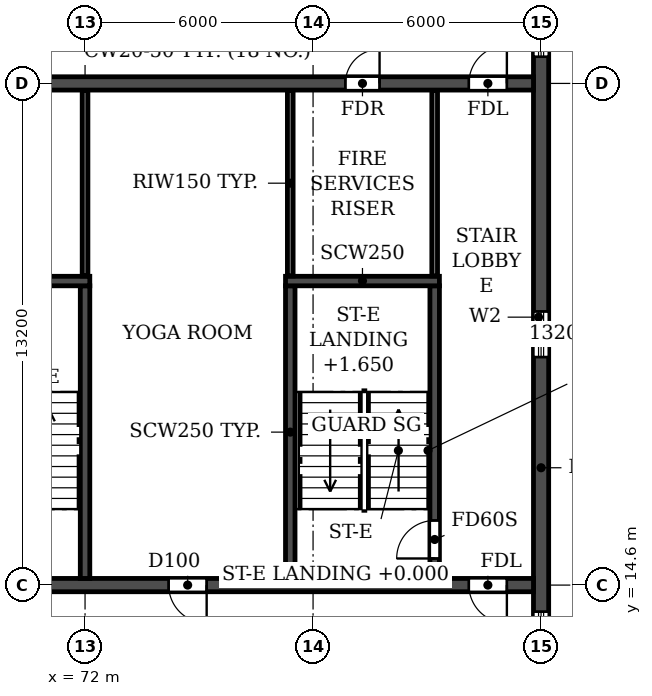
"""IFC4 building model, lengths in metres.
Left out: names, types, materials, properties, quantities, classifications, styles, units other than length and angle.
Written with IfcOpenShell. Run it as: python <this file> out.ifc"""

import sys

from ifc_helpers import new_model, si_unit, direction, frame, frame_2d, origin, place, context, subcontext, project, spatial, rectangle, extrude, element, fill, save


model = new_model("IFC4")
c1 = context("Model", 3, precision=1e-05, world=origin(), true_north=direction((0.0, 1.0)))
c2 = subcontext(c1, "Body", "Model", "MODEL_VIEW")
j1 = project(units=[si_unit("LENGTHUNIT", "METRE"), si_unit("PLANEANGLEUNIT", "RADIAN")], contexts=[c1])
p1 = place(None, origin())
s1 = spatial("IfcSite", under=j1, at=p1, CompositionType="ELEMENT")
p2 = place(p1, origin())
s2 = spatial("IfcBuilding", under=s1, at=p2, CompositionType="ELEMENT")
p3 = place(p2, frame((0.0, 0.0, 221.4)))
s3 = spatial("IfcBuildingStorey", under=s2, at=p3, CompositionType="ELEMENT", Elevation=221.4)
p4 = place(p3, frame((84.0, 4.683, 0.0), z_axis=(0.0, 0.0, 1.0), x_axis=(0.0, 1.0, 0.0)))
e1 = element("IfcWall", 1, at=p4, inside=s3, PredefinedType="SHEAR", context=c2, shape_type="SweptSolid", body=[
    extrude(rectangle(XDim=31.834, YDim=0.4, at=frame_2d((15.917, 0.0))), origin(), (0.0, 0.0, 1.0), 3.08),
])
p5 = place(p4, frame((23.817, 0.0, 0.9)))
e2 = element("IfcOpeningElement", 2, at=p5, cuts=e1, PredefinedType="OPENING", context=c2, shape_type="SweptSolid", body=[
    extrude(rectangle(XDim=1.2, YDim=1.5, at=frame_2d((0.6, 0.75))), frame((0.0, 0.21, 0.0), z_axis=(0.0, -1.0, 0.0), x_axis=(1.0, 0.0, 0.0)), (0.0, 0.0, 1.0), 0.42),
])
p6 = place(p4, frame((8.017, 0.0, 0.9)))
e3 = element("IfcOpeningElement", 3, at=p6, cuts=e1, PredefinedType="OPENING", context=c2, shape_type="SweptSolid", body=[
    extrude(rectangle(XDim=1.2, YDim=1.5, at=frame_2d((0.6, 0.75))), frame((0.0, 0.21, 0.0), z_axis=(0.0, -1.0, 0.0), x_axis=(1.0, 0.0, 0.0)), (0.0, 0.0, 1.0), 0.42),
])
p7 = place(p4, frame((27.694, 0.0, 0.6)))
e4 = element("IfcOpeningElement", 4, at=p7, cuts=e1, PredefinedType="OPENING", context=c2, shape_type="SweptSolid", body=[
    extrude(rectangle(XDim=2.2, YDim=1.8, at=frame_2d((1.1, 0.9))), frame((0.0, 0.21, 0.0), z_axis=(0.0, -1.0, 0.0), x_axis=(1.0, 0.0, 0.0)), (0.0, 0.0, 1.0), 0.42),
])
p8 = place(p4, frame((2.541, 0.0, 0.6)))
e5 = element("IfcOpeningElement", 5, at=p8, cuts=e1, PredefinedType="OPENING", context=c2, shape_type="SweptSolid", body=[
    extrude(rectangle(XDim=2.2, YDim=1.8, at=frame_2d((1.1, 0.9))), frame((0.0, 0.21, 0.0), z_axis=(0.0, -1.0, 0.0), x_axis=(1.0, 0.0, 0.0)), (0.0, 0.0, 1.0), 0.42),
])
p9 = place(p4, frame((15.917, 0.0, 0.9)))
e6 = element("IfcOpeningElement", 6, at=p9, cuts=e1, PredefinedType="OPENING", context=c2, shape_type="SweptSolid", body=[
    extrude(rectangle(XDim=1.2, YDim=1.5, at=frame_2d((0.6, 0.75))), frame((0.0, 0.21, 0.0), z_axis=(0.0, -1.0, 0.0), x_axis=(1.0, 0.0, 0.0)), (0.0, 0.0, 1.0), 0.42),
])
p10 = place(p3, frame((18.2, 14.6, 0.0), z_axis=(0.0, 0.0, 1.0), x_axis=(1.0, 0.0, 0.0)))
e7 = element("IfcWall", 7, at=p10, inside=s3, PredefinedType="SOLIDWALL", context=c2, shape_type="SweptSolid", body=[
    extrude(rectangle(XDim=65.6, YDim=0.35, at=frame_2d((32.8, 0.0))), origin(), (0.0, 0.0, 1.0), 3.08),
])
p11 = place(p10, frame((0.7, 0.0, 0.0)))
e8 = element("IfcOpeningElement", 8, at=p11, cuts=e7, PredefinedType="OPENING", context=c2, shape_type="SweptSolid", body=[
    extrude(rectangle(XDim=1.0, YDim=2.1, at=frame_2d((0.5, 1.05))), frame((0.0, 0.185, 0.0), z_axis=(0.0, -1.0, 0.0), x_axis=(1.0, 0.0, 0.0)), (0.0, 0.0, 1.0), 0.37),
])
p12 = place(p10, frame((8.6, 0.0, 0.0)))
e9 = element("IfcOpeningElement", 9, at=p12, cuts=e7, PredefinedType="OPENING", context=c2, shape_type="SweptSolid", body=[
    extrude(rectangle(XDim=1.0, YDim=2.1, at=frame_2d((0.5, 1.05))), frame((0.0, 0.185, 0.0), z_axis=(0.0, -1.0, 0.0), x_axis=(1.0, 0.0, 0.0)), (0.0, 0.0, 1.0), 0.37),
])
p13 = place(p10, frame((13.2, 0.0, 0.0)))
e10 = element("IfcOpeningElement", 10, at=p13, cuts=e7, PredefinedType="OPENING", context=c2, shape_type="SweptSolid", body=[
    extrude(rectangle(XDim=1.0, YDim=2.1, at=frame_2d((0.5, 1.05))), frame((0.0, 0.185, 0.0), z_axis=(0.0, -1.0, 0.0), x_axis=(1.0, 0.0, 0.0)), (0.0, 0.0, 1.0), 0.37),
])
p14 = place(p10, frame((27.1, 0.0, 0.0)))
e11 = element("IfcOpeningElement", 11, at=p14, cuts=e7, PredefinedType="OPENING", context=c2, shape_type="SweptSolid", body=[
    extrude(rectangle(XDim=1.0, YDim=2.1, at=frame_2d((0.5, 1.05))), frame((0.0, 0.185, 0.0), z_axis=(0.0, -1.0, 0.0), x_axis=(1.0, 0.0, 0.0)), (0.0, 0.0, 1.0), 0.37),
])
p15 = place(p10, frame((32.3, 0.0, 0.0)))
e12 = element("IfcOpeningElement", 12, at=p15, cuts=e7, PredefinedType="OPENING", context=c2, shape_type="SweptSolid", body=[
    extrude(rectangle(XDim=1.0, YDim=2.1, at=frame_2d((0.5, 1.05))), frame((0.0, 0.185, 0.0), z_axis=(0.0, -1.0, 0.0), x_axis=(1.0, 0.0, 0.0)), (0.0, 0.0, 1.0), 0.37),
])
p16 = place(p10, frame((35.95, 0.0, 0.0)))
e13 = element("IfcOpeningElement", 13, at=p16, cuts=e7, PredefinedType="OPENING", context=c2, shape_type="SweptSolid", body=[
    extrude(rectangle(XDim=1.5, YDim=2.1, at=frame_2d((0.75, 1.05))), frame((0.0, 0.185, 0.0), z_axis=(0.0, -1.0, 0.0), x_axis=(1.0, 0.0, 0.0)), (0.0, 0.0, 1.0), 0.37),
])
p17 = place(p10, frame((40.1, 0.0, 0.0)))
e14 = element("IfcOpeningElement", 14, at=p17, cuts=e7, PredefinedType="OPENING", context=c2, shape_type="SweptSolid", body=[
    extrude(rectangle(XDim=1.0, YDim=2.1, at=frame_2d((0.5, 1.05))), frame((0.0, 0.185, 0.0), z_axis=(0.0, -1.0, 0.0), x_axis=(1.0, 0.0, 0.0)), (0.0, 0.0, 1.0), 0.37),
])
p18 = place(p10, frame((51.4, 0.0, 0.0)))
e15 = element("IfcOpeningElement", 15, at=p18, cuts=e7, PredefinedType="OPENING", context=c2, shape_type="SweptSolid", body=[
    extrude(rectangle(XDim=1.0, YDim=2.1, at=frame_2d((0.5, 1.05))), frame((0.0, 0.185, 0.0), z_axis=(0.0, -1.0, 0.0), x_axis=(1.0, 0.0, 0.0)), (0.0, 0.0, 1.0), 0.37),
])
p19 = place(p10, frame((56.0, 0.0, 0.0)))
e16 = element("IfcOpeningElement", 16, at=p19, cuts=e7, PredefinedType="OPENING", context=c2, shape_type="SweptSolid", body=[
    extrude(rectangle(XDim=1.0, YDim=2.1, at=frame_2d((0.5, 1.05))), frame((0.0, 0.185, 0.0), z_axis=(0.0, -1.0, 0.0), x_axis=(1.0, 0.0, 0.0)), (0.0, 0.0, 1.0), 0.37),
])
p20 = place(p10, frame((63.9, 0.0, 0.0)))
e17 = element("IfcOpeningElement", 17, at=p20, cuts=e7, PredefinedType="OPENING", context=c2, shape_type="SweptSolid", body=[
    extrude(rectangle(XDim=1.0, YDim=2.1, at=frame_2d((0.5, 1.05))), frame((0.0, 0.185, 0.0), z_axis=(0.0, -1.0, 0.0), x_axis=(1.0, 0.0, 0.0)), (0.0, 0.0, 1.0), 0.37),
])
p21 = place(p3, frame((18.2, 27.8, 0.0), z_axis=(0.0, 0.0, 1.0), x_axis=(1.0, 0.0, 0.0)))
e18 = element("IfcWall", 18, at=p21, inside=s3, PredefinedType="SOLIDWALL", context=c2, shape_type="SweptSolid", body=[
    extrude(rectangle(XDim=65.6, YDim=0.35, at=frame_2d((32.8, 0.0))), origin(), (0.0, 0.0, 1.0), 3.08),
])
p22 = place(p21, frame((0.7, 0.0, 0.0)))
e19 = element("IfcOpeningElement", 19, at=p22, cuts=e18, PredefinedType="OPENING", context=c2, shape_type="SweptSolid", body=[
    extrude(rectangle(XDim=1.0, YDim=2.1, at=frame_2d((0.5, 1.05))), frame((0.0, 0.185, 0.0), z_axis=(0.0, -1.0, 0.0), x_axis=(1.0, 0.0, 0.0)), (0.0, 0.0, 1.0), 0.37),
])
p23 = place(p21, frame((4.05, 0.0, 0.0)))
e20 = element("IfcOpeningElement", 20, at=p23, cuts=e18, PredefinedType="OPENING", context=c2, shape_type="SweptSolid", body=[
    extrude(rectangle(XDim=0.9, YDim=2.1, at=frame_2d((0.45, 1.05))), frame((0.0, 0.185, 0.0), z_axis=(0.0, -1.0, 0.0), x_axis=(1.0, 0.0, 0.0)), (0.0, 0.0, 1.0), 0.37),
])
p24 = place(p21, frame((13.25, 0.0, 0.0)))
e21 = element("IfcOpeningElement", 21, at=p24, cuts=e18, PredefinedType="OPENING", context=c2, shape_type="SweptSolid", body=[
    extrude(rectangle(XDim=0.9, YDim=2.1, at=frame_2d((0.45, 1.05))), frame((0.0, 0.185, 0.0), z_axis=(0.0, -1.0, 0.0), x_axis=(1.0, 0.0, 0.0)), (0.0, 0.0, 1.0), 0.37),
])
p25 = place(p21, frame((17.7, 0.0, 0.0)))
e22 = element("IfcOpeningElement", 22, at=p25, cuts=e18, PredefinedType="OPENING", context=c2, shape_type="SweptSolid", body=[
    extrude(rectangle(XDim=1.0, YDim=2.1, at=frame_2d((0.5, 1.05))), frame((0.0, 0.185, 0.0), z_axis=(0.0, -1.0, 0.0), x_axis=(1.0, 0.0, 0.0)), (0.0, 0.0, 1.0), 0.37),
])
p26 = place(p21, frame((22.9, 0.0, 0.0)))
e23 = element("IfcOpeningElement", 23, at=p26, cuts=e18, PredefinedType="OPENING", context=c2, shape_type="SweptSolid", body=[
    extrude(rectangle(XDim=1.0, YDim=2.1, at=frame_2d((0.5, 1.05))), frame((0.0, 0.185, 0.0), z_axis=(0.0, -1.0, 0.0), x_axis=(1.0, 0.0, 0.0)), (0.0, 0.0, 1.0), 0.37),
])
p27 = place(p21, frame((29.4, 0.0, 0.0)))
e24 = element("IfcOpeningElement", 24, at=p27, cuts=e18, PredefinedType="OPENING", context=c2, shape_type="SweptSolid", body=[
    extrude(rectangle(XDim=1.0, YDim=2.1, at=frame_2d((0.5, 1.05))), frame((0.0, 0.185, 0.0), z_axis=(0.0, -1.0, 0.0), x_axis=(1.0, 0.0, 0.0)), (0.0, 0.0, 1.0), 0.37),
])
p28 = place(p21, frame((32.3, 0.0, 0.0)))
e25 = element("IfcOpeningElement", 25, at=p28, cuts=e18, PredefinedType="OPENING", context=c2, shape_type="SweptSolid", body=[
    extrude(rectangle(XDim=1.0, YDim=2.1, at=frame_2d((0.5, 1.05))), frame((0.0, 0.185, 0.0), z_axis=(0.0, -1.0, 0.0), x_axis=(1.0, 0.0, 0.0)), (0.0, 0.0, 1.0), 0.37),
])
p29 = place(p21, frame((36.25, 0.0, 0.0)))
e26 = element("IfcOpeningElement", 26, at=p29, cuts=e18, PredefinedType="OPENING", context=c2, shape_type="SweptSolid", body=[
    extrude(rectangle(XDim=1.5, YDim=2.1, at=frame_2d((0.75, 1.05))), frame((0.0, 0.185, 0.0), z_axis=(0.0, -1.0, 0.0), x_axis=(1.0, 0.0, 0.0)), (0.0, 0.0, 1.0), 0.37),
])
p30 = place(p21, frame((41.7, 0.0, 0.0)))
e27 = element("IfcOpeningElement", 27, at=p30, cuts=e18, PredefinedType="OPENING", context=c2, shape_type="SweptSolid", body=[
    extrude(rectangle(XDim=1.0, YDim=2.1, at=frame_2d((0.5, 1.05))), frame((0.0, 0.185, 0.0), z_axis=(0.0, -1.0, 0.0), x_axis=(1.0, 0.0, 0.0)), (0.0, 0.0, 1.0), 0.37),
])
p31 = place(p21, frame((46.9, 0.0, 0.0)))
e28 = element("IfcOpeningElement", 28, at=p31, cuts=e18, PredefinedType="OPENING", context=c2, shape_type="SweptSolid", body=[
    extrude(rectangle(XDim=1.0, YDim=2.1, at=frame_2d((0.5, 1.05))), frame((0.0, 0.185, 0.0), z_axis=(0.0, -1.0, 0.0), x_axis=(1.0, 0.0, 0.0)), (0.0, 0.0, 1.0), 0.37),
])
p32 = place(p21, frame((51.45, 0.0, 0.0)))
e29 = element("IfcOpeningElement", 29, at=p32, cuts=e18, PredefinedType="OPENING", context=c2, shape_type="SweptSolid", body=[
    extrude(rectangle(XDim=0.9, YDim=2.1, at=frame_2d((0.45, 1.05))), frame((0.0, 0.185, 0.0), z_axis=(0.0, -1.0, 0.0), x_axis=(1.0, 0.0, 0.0)), (0.0, 0.0, 1.0), 0.37),
])
p33 = place(p21, frame((60.65, 0.0, 0.0)))
e30 = element("IfcOpeningElement", 30, at=p33, cuts=e18, PredefinedType="OPENING", context=c2, shape_type="SweptSolid", body=[
    extrude(rectangle(XDim=0.9, YDim=2.1, at=frame_2d((0.45, 1.05))), frame((0.0, 0.185, 0.0), z_axis=(0.0, -1.0, 0.0), x_axis=(1.0, 0.0, 0.0)), (0.0, 0.0, 1.0), 0.37),
])
p34 = place(p21, frame((63.9, 0.0, 0.0)))
e31 = element("IfcOpeningElement", 31, at=p34, cuts=e18, PredefinedType="OPENING", context=c2, shape_type="SweptSolid", body=[
    extrude(rectangle(XDim=1.0, YDim=2.1, at=frame_2d((0.5, 1.05))), frame((0.0, 0.185, 0.0), z_axis=(0.0, -1.0, 0.0), x_axis=(1.0, 0.0, 0.0)), (0.0, 0.0, 1.0), 0.37),
])
p35 = place(p3, frame((72.0, 14.775, 0.0), z_axis=(0.0, 0.0, 1.0), x_axis=(0.0, 1.0, 0.0)))
e32 = element("IfcWall", 32, at=p35, inside=s3, PredefinedType="SOLIDWALL", context=c2, shape_type="SweptSolid", body=[
    extrude(rectangle(XDim=7.7, YDim=0.25, at=frame_2d((3.85, 0.0))), origin(), (0.0, 0.0, 1.0), 3.08),
])
p36 = place(p3, frame((68.075, 22.6, 0.0), z_axis=(0.0, 0.0, 1.0), x_axis=(1.0, 0.0, 0.0)))
e33 = element("IfcWall", 33, at=p36, inside=s3, PredefinedType="SOLIDWALL", context=c2, shape_type="SweptSolid", body=[
    extrude(rectangle(XDim=4.05, YDim=0.25, at=frame_2d((2.025, 0.0))), origin(), (0.0, 0.0, 1.0), 3.08),
])
p37 = place(p3, frame((77.4, 14.775, 0.0), z_axis=(0.0, 0.0, 1.0), x_axis=(0.0, 1.0, 0.0)))
e34 = element("IfcWall", 34, at=p37, inside=s3, PredefinedType="SOLIDWALL", context=c2, shape_type="SweptSolid", body=[
    extrude(rectangle(XDim=7.7, YDim=0.25, at=frame_2d((3.85, 0.0))), origin(), (0.0, 0.0, 1.0), 3.08),
])
p38 = place(p3, frame((81.2, 14.775, 0.0), z_axis=(0.0, 0.0, 1.0), x_axis=(0.0, 1.0, 0.0)))
e35 = element("IfcWall", 35, at=p38, inside=s3, PredefinedType="SOLIDWALL", context=c2, shape_type="SweptSolid", body=[
    extrude(rectangle(XDim=7.7, YDim=0.25, at=frame_2d((3.85, 0.0))), origin(), (0.0, 0.0, 1.0), 3.08),
])
p39 = place(p38, frame((0.525, 0.0, 0.0)))
e36 = element("IfcOpeningElement", 36, at=p39, cuts=e35, PredefinedType="OPENING", context=c2, shape_type="SweptSolid", body=[
    extrude(rectangle(XDim=1.0, YDim=2.1, at=frame_2d((0.5, 1.05))), frame((0.0, 0.135, 0.0), z_axis=(0.0, -1.0, 0.0), x_axis=(1.0, 0.0, 0.0)), (0.0, 0.0, 1.0), 0.27),
])
p40 = place(p3, frame((77.275, 22.6, 0.0), z_axis=(0.0, 0.0, 1.0), x_axis=(1.0, 0.0, 0.0)))
e37 = element("IfcWall", 37, at=p40, inside=s3, PredefinedType="SOLIDWALL", context=c2, shape_type="SweptSolid", body=[
    extrude(rectangle(XDim=4.05, YDim=0.25, at=frame_2d((2.025, 0.0))), origin(), (0.0, 0.0, 1.0), 3.08),
])
for number, where, z_axis, x_axis in (
    (38, (72.0, 22.735, 0.0), (0.0, 0.0, 1.0), (0.0, 1.0, 0.0)),
    (39, (77.4, 22.735, 0.0), (0.0, 0.0, 1.0), (0.0, 1.0, 0.0)),
    (40, (81.2, 22.735, 0.0), (0.0, 0.0, 1.0), (0.0, 1.0, 0.0)),
):
    element("IfcWall", number, at=place(p3, frame(where, z_axis=z_axis, x_axis=x_axis)), inside=s3, PredefinedType="PARTITIONING", context=c2, shape_type="SweptSolid", body=[
        extrude(rectangle(XDim=4.88, YDim=0.15, at=frame_2d((2.44, 0.0))), origin(), (0.0, 0.0, 1.0), 3.08),
    ])
p41 = place(p5, origin())
e41 = element("IfcWindow", 41, at=p41, inside=s3, PartitioningType="SINGLE_PANEL", PredefinedType="WINDOW", context=c2, shape_type="SweptSolid", body=[
    extrude(rectangle(XDim=1.2, YDim=1.5, at=frame_2d((0.6, 0.75))), frame((0.0, 0.03, 0.0), z_axis=(0.0, -1.0, 0.0), x_axis=(1.0, 0.0, 0.0)), (0.0, 0.0, 1.0), 0.06),
])
fill(e2, e41)
p42 = place(p6, origin())
e42 = element("IfcWindow", 42, at=p42, inside=s3, PartitioningType="SINGLE_PANEL", PredefinedType="WINDOW", context=c2, shape_type="SweptSolid", body=[
    extrude(rectangle(XDim=1.2, YDim=1.5, at=frame_2d((0.6, 0.75))), frame((0.0, 0.03, 0.0), z_axis=(0.0, -1.0, 0.0), x_axis=(1.0, 0.0, 0.0)), (0.0, 0.0, 1.0), 0.06),
])
fill(e3, e42)
p43 = place(p9, origin())
e43 = element("IfcWindow", 43, at=p43, inside=s3, PartitioningType="SINGLE_PANEL", PredefinedType="WINDOW", context=c2, shape_type="SweptSolid", body=[
    extrude(rectangle(XDim=1.2, YDim=1.5, at=frame_2d((0.6, 0.75))), frame((0.0, 0.03, 0.0), z_axis=(0.0, -1.0, 0.0), x_axis=(1.0, 0.0, 0.0)), (0.0, 0.0, 1.0), 0.06),
])
fill(e6, e43)
p44 = place(p33, origin())
e44 = element("IfcDoor", 44, at=p44, inside=s3, OperationType="SINGLE_SWING_RIGHT", PredefinedType="DOOR", context=c2, shape_type="SweptSolid", body=[
    extrude(rectangle(XDim=0.9, YDim=2.1, at=frame_2d((0.45, 1.05))), frame((0.0, 0.025, 0.0), z_axis=(0.0, -1.0, 0.0), x_axis=(1.0, 0.0, 0.0)), (0.0, 0.0, 1.0), 0.05),
])
fill(e30, e44)
p45 = place(p34, origin())
e45 = element("IfcDoor", 45, at=p45, inside=s3, OperationType="SINGLE_SWING_RIGHT", PredefinedType="DOOR", context=c2, shape_type="SweptSolid", body=[
    extrude(rectangle(XDim=1.0, YDim=2.1, at=frame_2d((0.5, 1.05))), frame((0.0, 0.025, 0.0), z_axis=(0.0, -1.0, 0.0), x_axis=(1.0, 0.0, 0.0)), (0.0, 0.0, 1.0), 0.05),
])
fill(e31, e45)
p46 = place(p19, frame((1.0, 0.0, 0.0), z_axis=(0.0, 0.0, 1.0), x_axis=(-1.0, 0.0, 0.0)))
e46 = element("IfcDoor", 46, at=p46, inside=s3, OperationType="SINGLE_SWING_LEFT", PredefinedType="DOOR", context=c2, shape_type="SweptSolid", body=[
    extrude(rectangle(XDim=1.0, YDim=2.1, at=frame_2d((0.5, 1.05))), frame((0.0, 0.025, 0.0), z_axis=(0.0, -1.0, 0.0), x_axis=(1.0, 0.0, 0.0)), (0.0, 0.0, 1.0), 0.05),
])
fill(e16, e46)
p47 = place(p20, frame((1.0, 0.0, 0.0), z_axis=(0.0, 0.0, 1.0), x_axis=(-1.0, 0.0, 0.0)))
e47 = element("IfcDoor", 47, at=p47, inside=s3, OperationType="SINGLE_SWING_LEFT", PredefinedType="DOOR", context=c2, shape_type="SweptSolid", body=[
    extrude(rectangle(XDim=1.0, YDim=2.1, at=frame_2d((0.5, 1.05))), frame((0.0, 0.025, 0.0), z_axis=(0.0, -1.0, 0.0), x_axis=(1.0, 0.0, 0.0)), (0.0, 0.0, 1.0), 0.05),
])
fill(e17, e47)
p48 = place(p39, origin())
e48 = element("IfcDoor", 48, at=p48, inside=s3, OperationType="SINGLE_SWING_LEFT", PredefinedType="DOOR", context=c2, shape_type="SweptSolid", body=[
    extrude(rectangle(XDim=1.0, YDim=2.1, at=frame_2d((0.5, 1.05))), frame((0.0, 0.025, 0.0), z_axis=(0.0, -1.0, 0.0), x_axis=(1.0, 0.0, 0.0)), (0.0, 0.0, 1.0), 0.05),
])
fill(e36, e48)
save(model, sys.argv[1])
